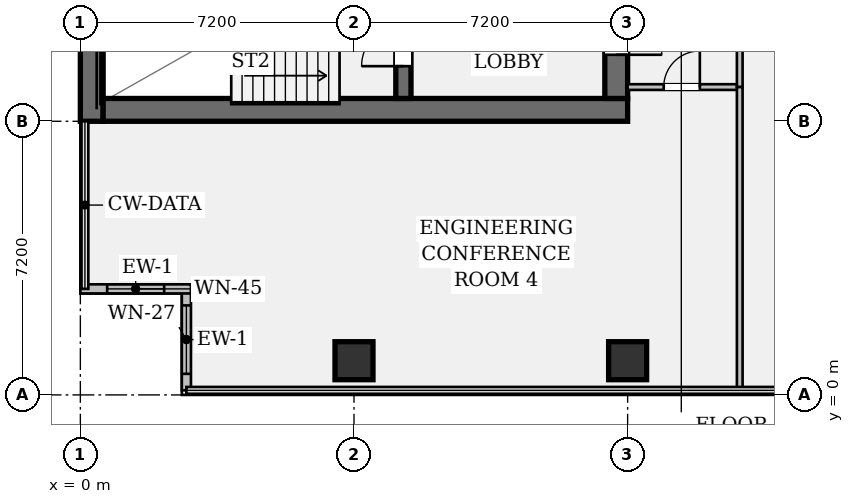
"""IFC4 building model, lengths in metres.
Left out: names, types, materials, properties, quantities, classifications, styles, units other than length and angle.
Written with IfcOpenShell. Run it as: python <this file> out.ifc"""

import sys

from ifc_helpers import new_model, si_unit, direction, frame, frame_2d, origin, origin_2d, place, context, subcontext, project, spatial, rectangle, hollow_rectangle, extrude, element, fill, save


model = new_model("IFC4")
c1 = context("Model", 3, precision=1e-05, world=origin(), true_north=direction((0.0, 1.0)))
c2 = subcontext(c1, "Body", "Model", "MODEL_VIEW")
j1 = project(units=[si_unit("LENGTHUNIT", "METRE"), si_unit("PLANEANGLEUNIT", "RADIAN")], contexts=[c1])
p1 = place(None, origin())
s1 = spatial("IfcSite", under=j1, at=p1, CompositionType="ELEMENT")
p2 = place(p1, origin())
s2 = spatial("IfcBuilding", under=s1, at=p2, CompositionType="ELEMENT")
p3 = place(p2, frame((0.0, 0.0, 58.1)))
s3 = spatial("IfcBuildingStorey", under=s2, at=p3, CompositionType="ELEMENT", Elevation=58.1)
p4 = place(p3, frame((0.3, 7.2, 0.0), z_axis=(0.0, 0.0, 1.0), x_axis=(0.0, 1.0, 0.0)))
e1 = element("IfcWall", 1, at=p4, inside=s3, PredefinedType="SHEAR", context=c2, shape_type="SweptSolid", body=[
    extrude(rectangle(XDim=28.8, YDim=0.6, at=frame_2d((14.4, 0.0))), origin(), (0.0, 0.0, 1.0), 3.57),
])
p5 = place(p3, frame((0.6, 7.5, 0.0), z_axis=(0.0, 0.0, 1.0), x_axis=(1.0, 0.0, 0.0)))
e2 = element("IfcWall", 2, at=p5, inside=s3, PredefinedType="SHEAR", context=c2, shape_type="SweptSolid", body=[
    extrude(rectangle(XDim=13.8, YDim=0.6, at=frame_2d((6.9, 0.0))), origin(), (0.0, 0.0, 1.0), 3.57),
])
p6 = place(p3, frame((14.1, 35.4, 0.0), z_axis=(0.0, 0.0, 1.0), x_axis=(0.0, -1.0, 0.0)))
e3 = element("IfcWall", 3, at=p6, inside=s3, PredefinedType="SHEAR", context=c2, shape_type="SweptSolid", body=[
    extrude(rectangle(XDim=27.6, YDim=0.6, at=frame_2d((13.8, 0.0))), origin(), (0.0, 0.0, 1.0), 3.57),
])
p7 = place(p6, frame((1.3, 0.0, 0.0)))
e4 = element("IfcOpeningElement", 4, at=p7, cuts=e3, PredefinedType="OPENING", context=c2, shape_type="SweptSolid", body=[
    extrude(rectangle(XDim=1.2, YDim=2.15, at=frame_2d((0.6, 1.075))), frame((0.0, 0.312, 0.0), z_axis=(0.0, -1.0, 0.0), x_axis=(1.0, 0.0, 0.0)), (0.0, 0.0, 1.0), 0.624),
])
p8 = place(p6, frame((25.25, 0.0, 0.0)))
e5 = element("IfcOpeningElement", 5, at=p8, cuts=e3, PredefinedType="OPENING", context=c2, shape_type="SweptSolid", body=[
    extrude(rectangle(XDim=1.2, YDim=2.15, at=frame_2d((0.6, 1.075))), frame((0.0, 0.312, 0.0), z_axis=(0.0, -1.0, 0.0), x_axis=(1.0, 0.0, 0.0)), (0.0, 0.0, 1.0), 0.624),
])
p9 = place(p6, frame((14.6, 0.0, 0.0)))
e6 = element("IfcOpeningElement", 6, at=p9, cuts=e3, PredefinedType="OPENING", context=c2, shape_type="SweptSolid", body=[
    extrude(rectangle(XDim=1.6, YDim=2.2, at=frame_2d((0.8, 1.1))), frame((0.0, 0.312, 0.0), z_axis=(0.0, -1.0, 0.0), x_axis=(1.0, 0.0, 0.0)), (0.0, 0.0, 1.0), 0.624),
])
p10 = place(p3, frame((8.5, 7.8, 0.0), z_axis=(0.0, 0.0, 1.0), x_axis=(0.0, 1.0, 0.0)))
e7 = element("IfcWall", 7, at=p10, inside=s3, PredefinedType="SHEAR", context=c2, shape_type="SweptSolid", body=[
    extrude(rectangle(XDim=3.68, YDim=0.4, at=frame_2d((1.84, 0.0))), origin(), (0.0, 0.0, 1.0), 3.57),
])
p11 = place(p10, frame((0.85, 0.0, 0.0)))
e8 = element("IfcOpeningElement", 8, at=p11, cuts=e7, PredefinedType="OPENING", context=c2, shape_type="SweptSolid", body=[
    extrude(rectangle(XDim=1.1, YDim=2.15, at=frame_2d((0.55, 1.075))), frame((0.0, 0.212, 0.0), z_axis=(0.0, -1.0, 0.0), x_axis=(1.0, 0.0, 0.0)), (0.0, 0.0, 1.0), 0.424),
])
for number, where, z_axis, x_axis in (
    (9, (7.2, 0.9, 0.0), (0.0, 0.0, 1.0), (1.0, 0.0, 0.0)),
    (10, (14.4, 0.9, 0.0), (0.0, 0.0, 1.0), (1.0, 0.0, 0.0)),
):
    element("IfcColumn", number, at=place(p3, frame(where, z_axis=z_axis, x_axis=x_axis)), inside=s3, PredefinedType="COLUMN", context=c2, shape_type="SweptSolid", body=[
        extrude(hollow_rectangle(XDim=1.0, YDim=1.0, WallThickness=0.065, at=origin_2d()), origin(), (0.0, 0.0, 1.0), 3.57),
    ])
p12 = place(p3, frame((2.79, 0.12, 0.0), z_axis=(0.0, 0.0, 1.0), x_axis=(0.0, 1.0, 0.0)))
e11 = element("IfcWall", 11, at=p12, inside=s3, PredefinedType="STANDARD", context=c2, shape_type="SweptSolid", body=[
    extrude(rectangle(XDim=2.67, YDim=0.24, at=frame_2d((1.335, 0.0))), origin(), (0.0, 0.0, 1.0), 3.57),
])
p13 = place(p12, frame((0.435, 0.0, 0.95)))
e12 = element("IfcOpeningElement", 12, at=p13, cuts=e11, PredefinedType="OPENING", context=c2, shape_type="SweptSolid", body=[
    extrude(rectangle(XDim=1.8, YDim=1.35, at=frame_2d((0.9, 0.675))), frame((0.0, 0.132, 0.0), z_axis=(0.0, -1.0, 0.0), x_axis=(1.0, 0.0, 0.0)), (0.0, 0.0, 1.0), 0.264),
])
p14 = place(p3, frame((2.91, 2.79, 0.0), z_axis=(0.0, 0.0, 1.0), x_axis=(-1.0, 0.0, 0.0)))
e13 = element("IfcWall", 13, at=p14, inside=s3, PredefinedType="STANDARD", context=c2, shape_type="SweptSolid", body=[
    extrude(rectangle(XDim=2.91, YDim=0.24, at=frame_2d((1.455, 0.0))), origin(), (0.0, 0.0, 1.0), 3.57),
])
p15 = place(p14, frame((0.705, 0.0, 0.95)))
e14 = element("IfcOpeningElement", 14, at=p15, cuts=e13, PredefinedType="OPENING", context=c2, shape_type="SweptSolid", body=[
    extrude(rectangle(XDim=1.5, YDim=1.8, at=frame_2d((0.75, 0.9))), frame((0.0, 0.132, 0.0), z_axis=(0.0, -1.0, 0.0), x_axis=(1.0, 0.0, 0.0)), (0.0, 0.0, 1.0), 0.264),
])
p16 = place(p3, frame((14.4, 8.1, 0.0), z_axis=(0.0, 0.0, 1.0), x_axis=(1.0, 0.0, 0.0)))
e15 = element("IfcWall", 15, at=p16, inside=s3, PredefinedType="PARTITIONING", context=c2, shape_type="SweptSolid", body=[
    extrude(rectangle(XDim=2.95, YDim=0.15, at=frame_2d((1.475, 0.0))), origin(), (0.0, 0.0, 1.0), 3.088),
])
p17 = place(p16, frame((0.95, 0.0, 0.0)))
e16 = element("IfcOpeningElement", 16, at=p17, cuts=e15, PredefinedType="OPENING", context=c2, shape_type="SweptSolid", body=[
    extrude(rectangle(XDim=0.95, YDim=2.15, at=frame_2d((0.475, 1.075))), frame((0.0, 0.087, 0.0), z_axis=(0.0, -1.0, 0.0), x_axis=(1.0, 0.0, 0.0)), (0.0, 0.0, 1.0), 0.174),
])
p18 = place(p3, frame((17.35, 8.1, 0.0), z_axis=(0.0, 0.0, 1.0), x_axis=(0.0, 1.0, 0.0)))
e17 = element("IfcWall", 17, at=p18, inside=s3, PredefinedType="PARTITIONING", context=c2, shape_type="SweptSolid", body=[
    extrude(rectangle(XDim=10.4, YDim=0.15, at=frame_2d((5.2, 0.0))), origin(), (0.0, 0.0, 1.0), 2.699),
])
p19 = place(p3, frame((17.35, 0.12, 0.0), z_axis=(0.0, 0.0, 1.0), x_axis=(0.0, 1.0, 0.0)))
e18 = element("IfcWall", 18, at=p19, inside=s3, PredefinedType="PARTITIONING", context=c2, shape_type="SweptSolid", body=[
    extrude(rectangle(XDim=7.98, YDim=0.15, at=frame_2d((3.99, 0.0))), origin(), (0.0, 0.0, 1.0), 2.699),
])
p20 = place(p13, origin())
e19 = element("IfcWindow", 19, at=p20, inside=s3, PartitioningType="SINGLE_PANEL", PredefinedType="WINDOW", context=c2, shape_type="SweptSolid", body=[
    extrude(rectangle(XDim=1.8, YDim=1.35, at=frame_2d((0.9, 0.675))), frame((0.0, 0.03, 0.0), z_axis=(0.0, -1.0, 0.0), x_axis=(1.0, 0.0, 0.0)), (0.0, 0.0, 1.0), 0.06),
])
fill(e12, e19)
p21 = place(p15, origin())
e20 = element("IfcWindow", 20, at=p21, inside=s3, PartitioningType="SINGLE_PANEL", PredefinedType="WINDOW", context=c2, shape_type="SweptSolid", body=[
    extrude(rectangle(XDim=1.5, YDim=1.8, at=frame_2d((0.75, 0.9))), frame((0.0, 0.03, 0.0), z_axis=(0.0, -1.0, 0.0), x_axis=(1.0, 0.0, 0.0)), (0.0, 0.0, 1.0), 0.06),
])
fill(e14, e20)
p22 = place(p11, origin())
e21 = element("IfcDoor", 21, at=p22, inside=s3, OperationType="SINGLE_SWING_LEFT", PredefinedType="DOOR", context=c2, shape_type="SweptSolid", body=[
    extrude(rectangle(XDim=1.1, YDim=2.15, at=frame_2d((0.55, 1.075))), frame((0.0, 0.025, 0.0), z_axis=(0.0, -1.0, 0.0), x_axis=(1.0, 0.0, 0.0)), (0.0, 0.0, 1.0), 0.05),
])
fill(e8, e21)
p23 = place(p8, origin())
e22 = element("IfcDoor", 22, at=p23, inside=s3, OperationType="SINGLE_SWING_RIGHT", PredefinedType="DOOR", context=c2, shape_type="SweptSolid", body=[
    extrude(rectangle(XDim=1.2, YDim=2.15, at=frame_2d((0.6, 1.075))), frame((0.0, 0.025, 0.0), z_axis=(0.0, -1.0, 0.0), x_axis=(1.0, 0.0, 0.0)), (0.0, 0.0, 1.0), 0.05),
])
fill(e5, e22)
p24 = place(p17, origin())
e23 = element("IfcDoor", 23, at=p24, inside=s3, OperationType="SINGLE_SWING_RIGHT", PredefinedType="DOOR", context=c2, shape_type="SweptSolid", body=[
    extrude(rectangle(XDim=0.95, YDim=2.15, at=frame_2d((0.475, 1.075))), frame((0.0, 0.025, 0.0), z_axis=(0.0, -1.0, 0.0), x_axis=(1.0, 0.0, 0.0)), (0.0, 0.0, 1.0), 0.05),
])
fill(e16, e23)
save(model, sys.argv[1])
